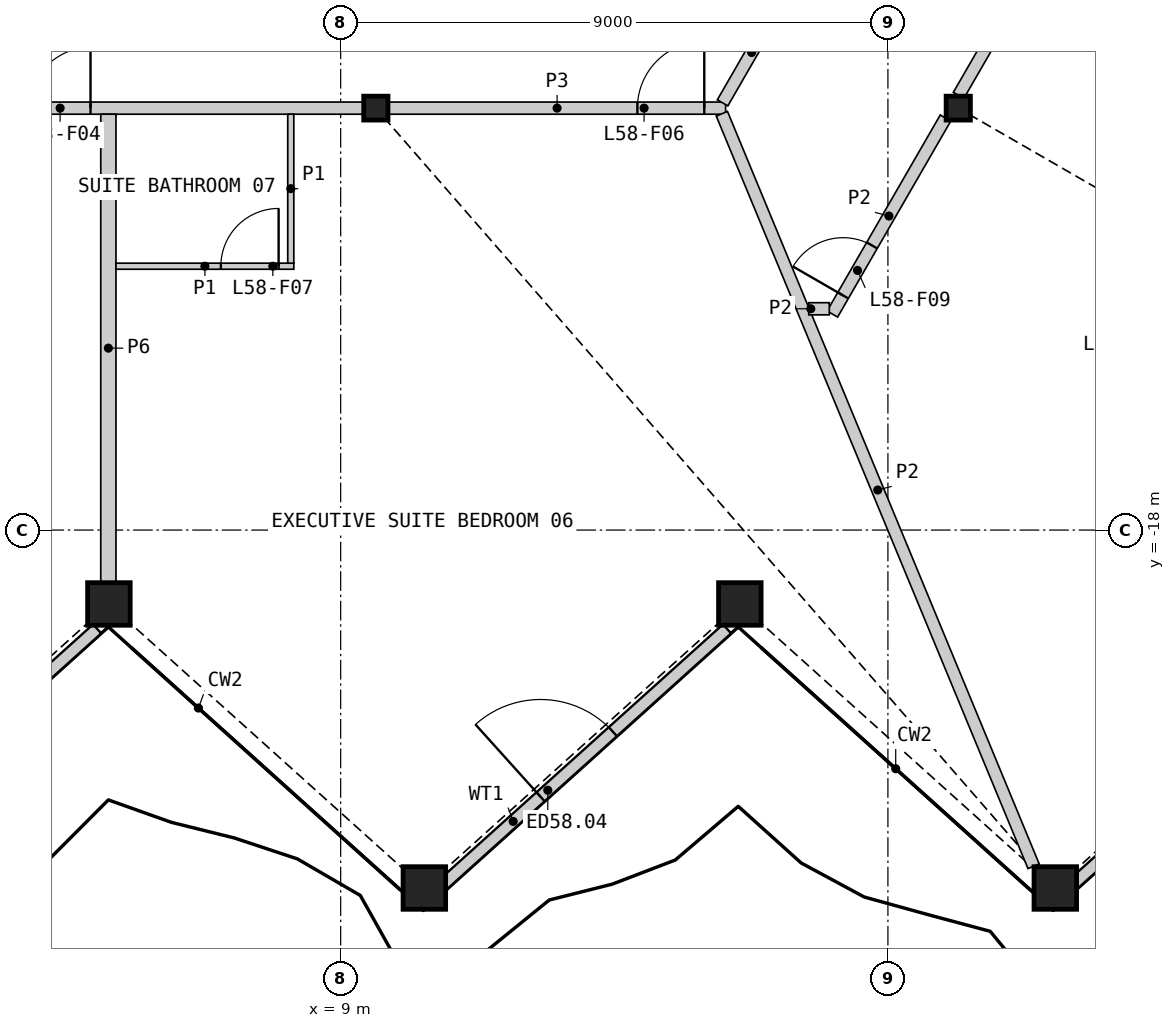
"""IFC4 building model, lengths in metres.
Left out: names, types, materials, properties, quantities, classifications, styles, units other than length and angle.
Written with IfcOpenShell. Run it as: python <this file> out.ifc"""

import sys

from ifc_helpers import new_model, si_unit, direction, frame, frame_2d, origin, origin_2d, place, context, subcontext, project, spatial, rectangle, hollow_rectangle, i_section, extrude, element, fill, save


model = new_model("IFC4")
c1 = context("Model", 3, precision=1e-05, world=origin(), true_north=direction((0.0, 1.0)))
c2 = subcontext(c1, "Body", "Model", "MODEL_VIEW")
j1 = project(units=[si_unit("LENGTHUNIT", "METRE"), si_unit("PLANEANGLEUNIT", "RADIAN")], contexts=[c1])
p1 = place(None, origin())
s1 = spatial("IfcSite", under=j1, at=p1, CompositionType="ELEMENT")
p2 = place(p1, origin())
s2 = spatial("IfcBuilding", under=s1, at=p2, CompositionType="ELEMENT")
p3 = place(p2, frame((0.0, 0.0, 259.8)))
s3 = spatial("IfcBuildingStorey", under=s2, at=p3, CompositionType="ELEMENT", Elevation=259.8)
for number, where, z_axis, x_axis in (
    (1, (5.188, -19.215, 0.0), (0.0, 0.0, 1.0), (1.0, 0.0, 0.0)),
    (2, (10.376, -23.887, 0.0), (0.0, 0.0, 1.0), (1.0, 0.0, 0.0)),
    (3, (15.565, -19.215, 0.0), (0.0, 0.0, 1.0), (1.0, 0.0, 0.0)),
    (4, (20.753, -23.887, 0.0), (0.0, 0.0, 1.0), (1.0, 0.0, 0.0)),
):
    element("IfcColumn", number, at=place(p3, frame(where, z_axis=z_axis, x_axis=x_axis)), inside=s3, PredefinedType="COLUMN", context=c2, shape_type="SweptSolid", body=[
        extrude(hollow_rectangle(XDim=0.7, YDim=0.7, WallThickness=0.045, at=origin_2d()), origin(), (0.0, 0.0, 1.0), 3.6),
    ])
for number, where, z_axis, x_axis in (
    (5, (9.578, -11.06, 0.0), (0.0, 0.0, 1.0), (1.0, 0.0, 0.0)),
    (6, (19.157, -11.06, 0.0), (0.0, 0.0, 1.0), (1.0, 0.0, 0.0)),
):
    element("IfcColumn", number, at=place(p3, frame(where, z_axis=z_axis, x_axis=x_axis)), inside=s3, PredefinedType="COLUMN", context=c2, shape_type="SweptSolid", body=[
        extrude(i_section(OverallWidth=0.399, OverallDepth=0.393, WebThickness=0.023, FlangeThickness=0.037, at=origin_2d()), origin(), (0.0, 0.0, 1.0), 3.6),
    ])
p4 = place(p3, frame((0.305, -23.848, 0.0), z_axis=(0.0, 0.0, 1.0), x_axis=(0.74314024121, 0.669135697668, 0.0)))
e7 = element("IfcWall", 7, at=p4, inside=s3, PredefinedType="SOLIDWALL", context=c2, shape_type="SweptSolid", body=[
    extrude(rectangle(XDim=6.311, YDim=0.2, at=frame_2d((3.156, 0.0))), origin(), (0.0, 0.0, 1.0), 2.701),
])
p5 = place(p4, frame((2.184, 0.0, 0.0)))
e8 = element("IfcOpeningElement", 8, at=p5, cuts=e7, PredefinedType="OPENING", context=c2, shape_type="SweptSolid", body=[
    extrude(rectangle(XDim=1.6, YDim=2.4, at=frame_2d((0.8, 1.2))), frame((0.0, 0.11, 0.0), z_axis=(0.0, -1.0, 0.0), x_axis=(1.0, 0.0, 0.0)), (0.0, 0.0, 1.0), 0.22),
])
p6 = place(p3, frame((10.664, -23.848, 0.0), z_axis=(0.0, 0.0, 1.0), x_axis=(0.74314024121, 0.669135697668, 0.0)))
e9 = element("IfcWall", 9, at=p6, inside=s3, PredefinedType="SOLIDWALL", context=c2, shape_type="SweptSolid", body=[
    extrude(rectangle(XDim=6.311, YDim=0.2, at=frame_2d((3.156, 0.0))), origin(), (0.0, 0.0, 1.0), 2.701),
])
p7 = place(p6, frame((2.184, 0.0, 0.0)))
e10 = element("IfcOpeningElement", 10, at=p7, cuts=e9, PredefinedType="OPENING", context=c2, shape_type="SweptSolid", body=[
    extrude(rectangle(XDim=1.6, YDim=2.4, at=frame_2d((0.8, 1.2))), frame((0.0, 0.11, 0.0), z_axis=(0.0, -1.0, 0.0), x_axis=(1.0, 0.0, 0.0)), (0.0, 0.0, 1.0), 0.22),
])
p8 = place(p3, frame((21.023, -23.848, 0.0), z_axis=(0.0, 0.0, 1.0), x_axis=(0.74314024121, 0.669135697668, 0.0)))
e11 = element("IfcWall", 11, at=p8, inside=s3, PredefinedType="SOLIDWALL", context=c2, shape_type="SweptSolid", body=[
    extrude(rectangle(XDim=6.311, YDim=0.2, at=frame_2d((3.156, 0.0))), origin(), (0.0, 0.0, 1.0), 2.701),
])
p9 = place(p8, frame((2.184, 0.0, 0.0)))
e12 = element("IfcOpeningElement", 12, at=p9, cuts=e11, PredefinedType="OPENING", context=c2, shape_type="SweptSolid", body=[
    extrude(rectangle(XDim=1.6, YDim=2.4, at=frame_2d((0.8, 1.2))), frame((0.0, 0.11, 0.0), z_axis=(0.0, -1.0, 0.0), x_axis=(1.0, 0.0, 0.0)), (0.0, 0.0, 1.0), 0.22),
])
p10 = place(p3, frame((0.209, -11.06, 0.0), z_axis=(0.0, 0.0, 1.0), x_axis=(1.0, 0.0, 0.0)))
e13 = element("IfcWall", 13, at=p10, inside=s3, PredefinedType="PARTITIONING", context=c2, shape_type="SweptSolid", body=[
    extrude(rectangle(XDim=9.159, YDim=0.2, at=frame_2d((4.58, 0.0))), origin(), (0.0, 0.0, 1.0), 3.25),
])
p11 = place(p10, frame((3.677, 0.0, 0.0)))
e14 = element("IfcOpeningElement", 14, at=p11, cuts=e13, PredefinedType="OPENING", context=c2, shape_type="SweptSolid", body=[
    extrude(rectangle(XDim=1.0, YDim=2.1, at=frame_2d((0.5, 1.05))), frame((0.0, 0.11, 0.0), z_axis=(0.0, -1.0, 0.0), x_axis=(1.0, 0.0, 0.0)), (0.0, 0.0, 1.0), 0.22),
])
p12 = place(p3, frame((5.179, -18.855, 0.0), z_axis=(0.0, 0.0, 1.0), x_axis=(0.0, 1.0, 0.0)))
e15 = element("IfcWall", 15, at=p12, inside=s3, PredefinedType="PARTITIONING", context=c2, shape_type="SweptSolid", body=[
    extrude(rectangle(XDim=7.695, YDim=0.25, at=frame_2d((3.848, 0.0))), origin(), (0.0, 0.0, 1.0), 2.404),
])
p13 = place(p3, frame((9.788, -11.06, 0.0), z_axis=(0.0, 0.0, 1.0), x_axis=(1.0, 0.0, 0.0)))
e16 = element("IfcWall", 16, at=p13, inside=s3, PredefinedType="PARTITIONING", context=c2, shape_type="SweptSolid", body=[
    extrude(rectangle(XDim=5.543, YDim=0.2, at=frame_2d((2.771, 0.0))), origin(), (0.0, 0.0, 1.0), 3.25),
])
p14 = place(p13, frame((4.092, 0.0, 0.0)))
e17 = element("IfcOpeningElement", 17, at=p14, cuts=e16, PredefinedType="OPENING", context=c2, shape_type="SweptSolid", body=[
    extrude(rectangle(XDim=1.1, YDim=2.1, at=frame_2d((0.55, 1.05))), frame((0.0, 0.11, 0.0), z_axis=(0.0, -1.0, 0.0), x_axis=(1.0, 0.0, 0.0)), (0.0, 0.0, 1.0), 0.22),
])
p15 = place(p3, frame((15.281, -10.974, 0.0), z_axis=(0.0, 0.0, 1.0), x_axis=(0.499989446428, 0.866031496806, 0.0)))
e18 = element("IfcWall", 18, at=p15, inside=s3, PredefinedType="PARTITIONING", context=c2, shape_type="SweptSolid", body=[
    extrude(rectangle(XDim=3.826, YDim=0.2, at=frame_2d((1.913, 0.0))), origin(), (0.0, 0.0, 1.0), 3.25),
])
p16 = place(p15, frame((1.386, 0.0, 0.0)))
e19 = element("IfcOpeningElement", 19, at=p16, cuts=e18, PredefinedType="OPENING", context=c2, shape_type="SweptSolid", body=[
    extrude(rectangle(XDim=0.95, YDim=2.1, at=frame_2d((0.475, 1.05))), frame((0.0, 0.11, 0.0), z_axis=(0.0, -1.0, 0.0), x_axis=(1.0, 0.0, 0.0)), (0.0, 0.0, 1.0), 0.22),
])
p17 = place(p3, frame((15.269, -11.153, 0.0), z_axis=(0.0, 0.0, 1.0), x_axis=(0.382692998932, -0.923875569851, 0.0)))
e20 = element("IfcWall", 20, at=p17, inside=s3, PredefinedType="PARTITIONING", context=c2, shape_type="SweptSolid", body=[
    extrude(rectangle(XDim=13.397, YDim=0.2, at=frame_2d((6.698, 0.0))), origin(), (0.0, 0.0, 1.0), 2.404),
])
p18 = place(p3, frame((19.162, -10.851, 0.0), z_axis=(0.0, 0.0, 1.0), x_axis=(0.500008654708, 0.866020406929, 0.0)))
e21 = element("IfcWall", 21, at=p18, inside=s3, PredefinedType="PARTITIONING", context=c2, shape_type="SweptSolid", body=[
    extrude(rectangle(XDim=6.67, YDim=0.2, at=frame_2d((3.335, 0.0))), origin(), (0.0, 0.0, 1.0), 2.404),
])
p19 = place(p3, frame((17.086, -14.447, 0.0), z_axis=(0.0, 0.0, 1.0), x_axis=(0.500004411858, 0.866022856582, 0.0)))
e22 = element("IfcWall", 22, at=p19, inside=s3, PredefinedType="PARTITIONING", context=c2, shape_type="SweptSolid", body=[
    extrude(rectangle(XDim=3.723, YDim=0.2, at=frame_2d((1.861, 0.0))), origin(), (0.0, 0.0, 1.0), 2.404),
])
p20 = place(p19, frame((0.353, 0.0, 0.0)))
e23 = element("IfcOpeningElement", 23, at=p20, cuts=e22, PredefinedType="OPENING", context=c2, shape_type="SweptSolid", body=[
    extrude(rectangle(XDim=0.95, YDim=2.1, at=frame_2d((0.475, 1.05))), frame((0.0, 0.11, 0.0), z_axis=(0.0, -1.0, 0.0), x_axis=(1.0, 0.0, 0.0)), (0.0, 0.0, 1.0), 0.22),
])
p21 = place(p3, frame((16.698, -14.36, 0.0), z_axis=(0.0, 0.0, 1.0), x_axis=(1.0, 0.0, 0.0)))
e24 = element("IfcWall", 24, at=p21, inside=s3, PredefinedType="PARTITIONING", context=c2, shape_type="SweptSolid", body=[
    extrude(rectangle(XDim=0.338, YDim=0.2, at=frame_2d((0.169, 0.0))), origin(), (0.0, 0.0, 1.0), 2.404),
])
p22 = place(p3, frame((5.304, -13.66, 0.0), z_axis=(0.0, 0.0, 1.0), x_axis=(1.0, 0.0, 0.0)))
e25 = element("IfcWall", 25, at=p22, inside=s3, PredefinedType="PARTITIONING", context=c2, shape_type="SweptSolid", body=[
    extrude(rectangle(XDim=2.925, YDim=0.1, at=frame_2d((1.462, 0.0))), origin(), (0.0, 0.0, 1.0), 2.404),
])
p23 = place(p22, frame((1.725, 0.0, 0.0)))
e26 = element("IfcOpeningElement", 26, at=p23, cuts=e25, PredefinedType="OPENING", context=c2, shape_type="SweptSolid", body=[
    extrude(rectangle(XDim=0.95, YDim=2.1, at=frame_2d((0.475, 1.05))), frame((0.0, 0.06, 0.0), z_axis=(0.0, -1.0, 0.0), x_axis=(1.0, 0.0, 0.0)), (0.0, 0.0, 1.0), 0.12),
])
p24 = place(p3, frame((8.179, -13.61, 0.0), z_axis=(0.0, 0.0, 1.0), x_axis=(0.0, 1.0, 0.0)))
e27 = element("IfcWall", 27, at=p24, inside=s3, PredefinedType="PARTITIONING", context=c2, shape_type="SweptSolid", body=[
    extrude(rectangle(XDim=2.45, YDim=0.1, at=frame_2d((1.225, 0.0))), origin(), (0.0, 0.0, 1.0), 2.404),
])
p25 = place(p7, origin())
e28 = element("IfcDoor", 28, at=p25, inside=s3, OperationType="DOUBLE_DOOR_SINGLE_SWING", PredefinedType="DOOR", context=c2, shape_type="SweptSolid", body=[
    extrude(rectangle(XDim=1.6, YDim=2.4, at=frame_2d((0.8, 1.2))), frame((0.0, 0.025, 0.0), z_axis=(0.0, -1.0, 0.0), x_axis=(1.0, 0.0, 0.0)), (0.0, 0.0, 1.0), 0.05),
])
fill(e10, e28)
p26 = place(p11, origin())
e29 = element("IfcDoor", 29, at=p26, inside=s3, OperationType="SINGLE_SWING_RIGHT", PredefinedType="DOOR", context=c2, shape_type="SweptSolid", body=[
    extrude(rectangle(XDim=1.0, YDim=2.1, at=frame_2d((0.5, 1.05))), frame((0.0, 0.025, 0.0), z_axis=(0.0, -1.0, 0.0), x_axis=(1.0, 0.0, 0.0)), (0.0, 0.0, 1.0), 0.05),
])
fill(e14, e29)
p27 = place(p14, origin())
e30 = element("IfcDoor", 30, at=p27, inside=s3, OperationType="SINGLE_SWING_RIGHT", PredefinedType="DOOR", context=c2, shape_type="SweptSolid", body=[
    extrude(rectangle(XDim=1.1, YDim=2.1, at=frame_2d((0.55, 1.05))), frame((0.0, 0.025, 0.0), z_axis=(0.0, -1.0, 0.0), x_axis=(1.0, 0.0, 0.0)), (0.0, 0.0, 1.0), 0.05),
])
fill(e17, e30)
p28 = place(p23, origin())
e31 = element("IfcDoor", 31, at=p28, inside=s3, OperationType="SINGLE_SWING_RIGHT", PredefinedType="DOOR", context=c2, shape_type="SweptSolid", body=[
    extrude(rectangle(XDim=0.95, YDim=2.1, at=frame_2d((0.475, 1.05))), frame((0.0, 0.025, 0.0), z_axis=(0.0, -1.0, 0.0), x_axis=(1.0, 0.0, 0.0)), (0.0, 0.0, 1.0), 0.05),
])
fill(e26, e31)
p29 = place(p20, origin())
e32 = element("IfcDoor", 32, at=p29, inside=s3, OperationType="SINGLE_SWING_LEFT", PredefinedType="DOOR", context=c2, shape_type="SweptSolid", body=[
    extrude(rectangle(XDim=0.95, YDim=2.1, at=frame_2d((0.475, 1.05))), frame((0.0, 0.025, 0.0), z_axis=(0.0, -1.0, 0.0), x_axis=(1.0, 0.0, 0.0)), (0.0, 0.0, 1.0), 0.05),
])
fill(e23, e32)
save(model, sys.argv[1])
